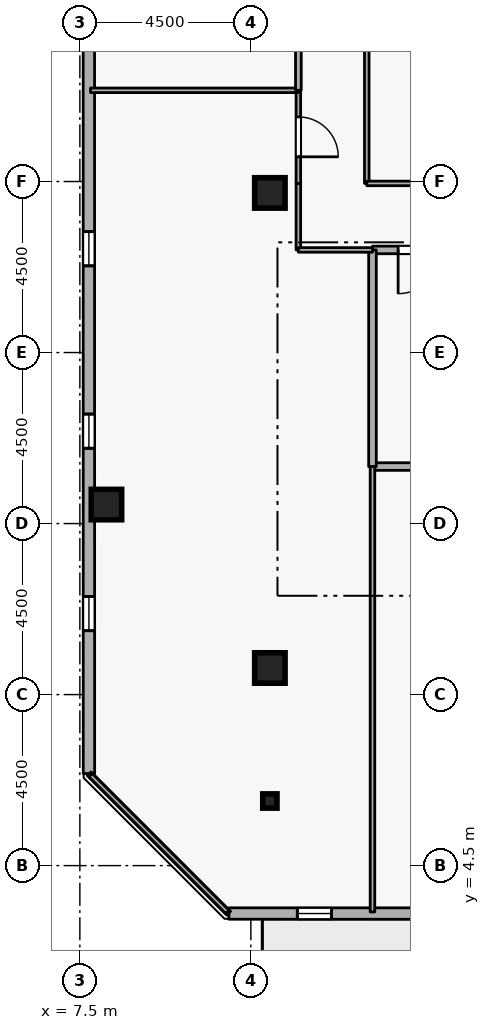
"""IFC4 building model, lengths in metres.
Left out: names, types, materials, properties, quantities, classifications, styles, units other than length and angle.
Written with IfcOpenShell. Run it as: python <this file> out.ifc"""

import sys

from ifc_helpers import new_model, si_unit, direction, frame, frame_2d, origin, origin_2d, place, context, subcontext, project, spatial, rectangle, i_section, extrude, element, fill, save


model = new_model("IFC4")
c1 = context("Model", 3, precision=1e-05, world=origin(), true_north=direction((0.0, 1.0)))
c2 = subcontext(c1, "Body", "Model", "MODEL_VIEW")
j1 = project(units=[si_unit("LENGTHUNIT", "METRE"), si_unit("PLANEANGLEUNIT", "RADIAN")], contexts=[c1])
p1 = place(None, origin())
s1 = spatial("IfcSite", under=j1, at=p1, CompositionType="ELEMENT")
p2 = place(p1, origin())
s2 = spatial("IfcBuilding", under=s1, at=p2, CompositionType="ELEMENT")
p3 = place(p2, frame((0.0, 0.0, 261.9)))
s3 = spatial("IfcBuildingStorey", under=s2, at=p3, CompositionType="ELEMENT", Elevation=261.9)
for number, where, z_axis, x_axis in (
    (1, (12.5, 9.7, 0.0), (0.0, 0.0, 1.0), (1.0, 0.0, 0.0)),
    (2, (8.2, 14.0, 0.0), (0.0, 0.0, 1.0), (1.0, 0.0, 0.0)),
    (3, (12.5, 22.2, 0.0), (0.0, 0.0, 1.0), (1.0, 0.0, 0.0)),
):
    element("IfcColumn", number, at=place(p3, frame(where, z_axis=z_axis, x_axis=x_axis)), inside=s3, PredefinedType="COLUMN", context=c2, shape_type="SweptSolid", body=[
        extrude(rectangle(XDim=0.8, YDim=0.8, at=origin_2d()), origin(), (0.0, 0.0, 1.0), 3.6),
    ])
p4 = place(p3, frame((12.5, 6.2, 0.0), z_axis=(0.0, 0.0, 1.0), x_axis=(1.0, 0.0, 0.0)))
e4 = element("IfcColumn", 4, at=p4, inside=s3, PredefinedType="COLUMN", context=c2, shape_type="SweptSolid", body=[
    extrude(i_section(OverallWidth=0.375, OverallDepth=0.375, WebThickness=0.017, FlangeThickness=0.027, FilletRadius=0.015, at=origin_2d()), origin(), (0.0, 0.0, 1.0), 3.6),
])
p5 = place(p3, frame((11.422, 3.239, 0.0), z_axis=(0.0, 0.0, 1.0), x_axis=(0.999999994606, -0.000103863011, 0.0)))
e5 = element("IfcWall", 5, at=p5, inside=s3, PredefinedType="STANDARD", context=c2, shape_type="SweptSolid", body=[
    extrude(rectangle(XDim=35.259, YDim=0.3, at=frame_2d((17.629, 0.0))), origin(), (0.0, 0.0, 1.0), 2.7),
])
p6 = place(p5, frame((22.58, 0.0, 0.0)))
e6 = element("IfcOpeningElement", 6, at=p6, cuts=e5, PredefinedType="OPENING", context=c2, shape_type="SweptSolid", body=[
    extrude(rectangle(XDim=1.0, YDim=2.08, at=frame_2d((0.5, 1.04))), frame((0.0, 0.16, 0.0), z_axis=(0.0, -1.0, 0.0), x_axis=(1.0, 0.0, 0.0)), (0.0, 0.0, 1.0), 0.32),
])
p7 = place(p5, frame((1.8, 0.0, 0.72)))
e7 = element("IfcOpeningElement", 7, at=p7, cuts=e5, PredefinedType="OPENING", context=c2, shape_type="SweptSolid", body=[
    extrude(rectangle(XDim=0.9, YDim=1.75, at=frame_2d((0.45, 0.875))), frame((0.0, 0.16, 0.0), z_axis=(0.0, -1.0, 0.0), x_axis=(1.0, 0.0, 0.0)), (0.0, 0.0, 1.0), 0.32),
])
p8 = place(p5, frame((6.6, 0.0, 0.72)))
e8 = element("IfcOpeningElement", 8, at=p8, cuts=e5, PredefinedType="OPENING", context=c2, shape_type="SweptSolid", body=[
    extrude(rectangle(XDim=0.9, YDim=1.75, at=frame_2d((0.45, 0.875))), frame((0.0, 0.16, 0.0), z_axis=(0.0, -1.0, 0.0), x_axis=(1.0, 0.0, 0.0)), (0.0, 0.0, 1.0), 0.32),
])
p9 = place(p5, frame((11.4, 0.0, 0.72)))
e9 = element("IfcOpeningElement", 9, at=p9, cuts=e5, PredefinedType="OPENING", context=c2, shape_type="SweptSolid", body=[
    extrude(rectangle(XDim=0.9, YDim=1.75, at=frame_2d((0.45, 0.875))), frame((0.0, 0.16, 0.0), z_axis=(0.0, -1.0, 0.0), x_axis=(1.0, 0.0, 0.0)), (0.0, 0.0, 1.0), 0.32),
])
p10 = place(p5, frame((16.2, 0.0, 0.72)))
e10 = element("IfcOpeningElement", 10, at=p10, cuts=e5, PredefinedType="OPENING", context=c2, shape_type="SweptSolid", body=[
    extrude(rectangle(XDim=0.9, YDim=1.75, at=frame_2d((0.45, 0.875))), frame((0.0, 0.16, 0.0), z_axis=(0.0, -1.0, 0.0), x_axis=(1.0, 0.0, 0.0)), (0.0, 0.0, 1.0), 0.32),
])
p11 = place(p5, frame((25.8, 0.0, 0.72)))
e11 = element("IfcOpeningElement", 11, at=p11, cuts=e5, PredefinedType="OPENING", context=c2, shape_type="SweptSolid", body=[
    extrude(rectangle(XDim=0.9, YDim=1.75, at=frame_2d((0.45, 0.875))), frame((0.0, 0.16, 0.0), z_axis=(0.0, -1.0, 0.0), x_axis=(1.0, 0.0, 0.0)), (0.0, 0.0, 1.0), 0.32),
])
p12 = place(p5, frame((30.6, 0.0, 0.72)))
e12 = element("IfcOpeningElement", 12, at=p12, cuts=e5, PredefinedType="OPENING", context=c2, shape_type="SweptSolid", body=[
    extrude(rectangle(XDim=0.9, YDim=1.75, at=frame_2d((0.45, 0.875))), frame((0.0, 0.16, 0.0), z_axis=(0.0, -1.0, 0.0), x_axis=(1.0, 0.0, 0.0)), (0.0, 0.0, 1.0), 0.32),
])
p13 = place(p3, frame((7.735, 42.181, 0.0), z_axis=(0.0, 0.0, 1.0), x_axis=(0.000103863011, -0.999999994606, 0.0)))
e13 = element("IfcWall", 13, at=p13, inside=s3, PredefinedType="STANDARD", context=c2, shape_type="SweptSolid", body=[
    extrude(rectangle(XDim=35.259, YDim=0.3, at=frame_2d((17.629, 0.0))), origin(), (0.0, 0.0, 1.0), 2.7),
])
p14 = place(p13, frame((6.6, 0.0, 0.72)))
e14 = element("IfcOpeningElement", 14, at=p14, cuts=e13, PredefinedType="OPENING", context=c2, shape_type="SweptSolid", body=[
    extrude(rectangle(XDim=0.9, YDim=1.75, at=frame_2d((0.45, 0.875))), frame((0.0, 0.16, 0.0), z_axis=(0.0, -1.0, 0.0), x_axis=(1.0, 0.0, 0.0)), (0.0, 0.0, 1.0), 0.32),
])
p15 = place(p13, frame((11.4, 0.0, 0.72)))
e15 = element("IfcOpeningElement", 15, at=p15, cuts=e13, PredefinedType="OPENING", context=c2, shape_type="SweptSolid", body=[
    extrude(rectangle(XDim=0.9, YDim=1.75, at=frame_2d((0.45, 0.875))), frame((0.0, 0.16, 0.0), z_axis=(0.0, -1.0, 0.0), x_axis=(1.0, 0.0, 0.0)), (0.0, 0.0, 1.0), 0.32),
])
p16 = place(p13, frame((21.0, 0.0, 0.72)))
e16 = element("IfcOpeningElement", 16, at=p16, cuts=e13, PredefinedType="OPENING", context=c2, shape_type="SweptSolid", body=[
    extrude(rectangle(XDim=0.9, YDim=1.75, at=frame_2d((0.45, 0.875))), frame((0.0, 0.16, 0.0), z_axis=(0.0, -1.0, 0.0), x_axis=(1.0, 0.0, 0.0)), (0.0, 0.0, 1.0), 0.32),
])
p17 = place(p13, frame((25.8, 0.0, 0.72)))
e17 = element("IfcOpeningElement", 17, at=p17, cuts=e13, PredefinedType="OPENING", context=c2, shape_type="SweptSolid", body=[
    extrude(rectangle(XDim=0.9, YDim=1.75, at=frame_2d((0.45, 0.875))), frame((0.0, 0.16, 0.0), z_axis=(0.0, -1.0, 0.0), x_axis=(1.0, 0.0, 0.0)), (0.0, 0.0, 1.0), 0.32),
])
p18 = place(p13, frame((30.6, 0.0, 0.72)))
e18 = element("IfcOpeningElement", 18, at=p18, cuts=e13, PredefinedType="OPENING", context=c2, shape_type="SweptSolid", body=[
    extrude(rectangle(XDim=0.9, YDim=1.75, at=frame_2d((0.45, 0.875))), frame((0.0, 0.16, 0.0), z_axis=(0.0, -1.0, 0.0), x_axis=(1.0, 0.0, 0.0)), (0.0, 0.0, 1.0), 0.32),
])
p19 = place(p3, frame((15.2, 15.0, 0.0), z_axis=(0.0, 0.0, 1.0), x_axis=(1.0, 0.0, 0.0)))
e19 = element("IfcWall", 19, at=p19, inside=s3, PredefinedType="STANDARD", context=c2, shape_type="SweptSolid", body=[
    extrude(rectangle(XDim=2.5, YDim=0.2, at=frame_2d((1.25, 0.0))), origin(), (0.0, 0.0, 1.0), 3.34),
])
p20 = place(p3, frame((17.7, 20.7, 0.0), z_axis=(0.0, 0.0, 1.0), x_axis=(-1.0, 0.0, 0.0)))
e20 = element("IfcWall", 20, at=p20, inside=s3, PredefinedType="STANDARD", context=c2, shape_type="SweptSolid", body=[
    extrude(rectangle(XDim=2.5, YDim=0.2, at=frame_2d((1.25, 0.0))), origin(), (0.0, 0.0, 1.0), 3.34),
])
p21 = place(p20, frame((0.675, 0.0, 0.0)))
e21 = element("IfcOpeningElement", 21, at=p21, cuts=e20, PredefinedType="OPENING", context=c2, shape_type="SweptSolid", body=[
    extrude(rectangle(XDim=1.15, YDim=2.1, at=frame_2d((0.575, 1.05))), frame((0.0, 0.11, 0.0), z_axis=(0.0, -1.0, 0.0), x_axis=(1.0, 0.0, 0.0)), (0.0, 0.0, 1.0), 0.22),
])
p22 = place(p3, frame((15.2, 20.7, 0.0), z_axis=(0.0, 0.0, 1.0), x_axis=(0.0, -1.0, 0.0)))
e22 = element("IfcWall", 22, at=p22, inside=s3, PredefinedType="STANDARD", context=c2, shape_type="SweptSolid", body=[
    extrude(rectangle(XDim=5.7, YDim=0.2, at=frame_2d((2.85, 0.0))), origin(), (0.0, 0.0, 1.0), 3.34),
])
p23 = place(p3, frame((13.25, 24.9, 0.0), z_axis=(0.0, 0.0, 1.0), x_axis=(0.0, -1.0, 0.0)))
e23 = element("IfcWall", 23, at=p23, inside=s3, PredefinedType="PARTITIONING", context=c2, shape_type="SweptSolid", body=[
    extrude(rectangle(XDim=2.45, YDim=0.12, at=frame_2d((1.225, 0.0))), origin(), (0.0, 0.0, 1.0), 3.34),
])
p24 = place(p23, frame((0.7, 0.0, 0.0)))
e24 = element("IfcOpeningElement", 24, at=p24, cuts=e23, PredefinedType="OPENING", context=c2, shape_type="SweptSolid", body=[
    extrude(rectangle(XDim=1.05, YDim=2.1, at=frame_2d((0.525, 1.05))), frame((0.0, 0.07, 0.0), z_axis=(0.0, -1.0, 0.0), x_axis=(1.0, 0.0, 0.0)), (0.0, 0.0, 1.0), 0.14),
])
p25 = place(p3, frame((13.25, 22.45, 0.0), z_axis=(0.0, 0.0, 1.0), x_axis=(0.0, -1.0, 0.0)))
e25 = element("IfcWall", 25, at=p25, inside=s3, PredefinedType="PARTITIONING", context=c2, shape_type="SweptSolid", body=[
    extrude(rectangle(XDim=1.75, YDim=0.12, at=frame_2d((0.875, 0.0))), origin(), (0.0, 0.0, 1.0), 3.34),
])
p26 = place(p3, frame((13.25, 20.7, 0.0), z_axis=(0.0, 0.0, 1.0), x_axis=(1.0, 0.0, 0.0)))
e26 = element("IfcWall", 26, at=p26, inside=s3, PredefinedType="PARTITIONING", context=c2, shape_type="SweptSolid", body=[
    extrude(rectangle(XDim=1.95, YDim=0.12, at=frame_2d((0.975, 0.0))), origin(), (0.0, 0.0, 1.0), 3.34),
])
p27 = place(p3, frame((15.2, 15.0, 0.0), z_axis=(0.0, 0.0, 1.0), x_axis=(0.0, -1.0, 0.0)))
e27 = element("IfcWall", 27, at=p27, inside=s3, PredefinedType="PARTITIONING", context=c2, shape_type="SweptSolid", body=[
    extrude(rectangle(XDim=11.72, YDim=0.12, at=frame_2d((5.86, 0.0))), origin(), (0.0, 0.0, 1.0), 3.34),
])
p28 = place(p3, frame((11.383, 3.28, 0.0), z_axis=(0.0, 0.0, 1.0), x_axis=(-0.707106781187, 0.707106781187, 0.0)))
e28 = element("IfcWall", 28, at=p28, inside=s3, PredefinedType="PARTITIONING", context=c2, shape_type="SweptSolid", body=[
    extrude(rectangle(XDim=5.095, YDim=0.12, at=frame_2d((2.547, 0.0))), origin(), (0.0, 0.0, 1.0), 3.34),
])
p29 = place(p3, frame((7.78, 24.9, 0.0), z_axis=(0.0, 0.0, 1.0), x_axis=(1.0, 0.0, 0.0)))
e29 = element("IfcWall", 29, at=p29, inside=s3, PredefinedType="PARTITIONING", context=c2, shape_type="SweptSolid", body=[
    extrude(rectangle(XDim=5.47, YDim=0.12, at=frame_2d((2.735, 0.0))), origin(), (0.0, 0.0, 1.0), 3.34),
])
p30 = place(p3, frame((13.25, 29.1, 0.0), z_axis=(0.0, 0.0, 1.0), x_axis=(0.0, -1.0, 0.0)))
e30 = element("IfcWall", 30, at=p30, inside=s3, PredefinedType="PARTITIONING", context=c2, shape_type="SweptSolid", body=[
    extrude(rectangle(XDim=4.2, YDim=0.15, at=frame_2d((2.1, 0.0))), origin(), (0.0, 0.0, 1.0), 3.34),
])
p31 = place(p30, frame((1.45, 0.0, 0.0)))
e31 = element("IfcOpeningElement", 31, at=p31, cuts=e30, PredefinedType="OPENING", context=c2, shape_type="SweptSolid", body=[
    extrude(rectangle(XDim=1.3, YDim=2.12, at=frame_2d((0.65, 1.06))), frame((0.0, 0.085, 0.0), z_axis=(0.0, -1.0, 0.0), x_axis=(1.0, 0.0, 0.0)), (0.0, 0.0, 1.0), 0.17),
])
p32 = place(p3, frame((15.05, 22.45, 0.0), z_axis=(0.0, 0.0, 1.0), x_axis=(0.0, 1.0, 0.0)))
e32 = element("IfcWall", 32, at=p32, inside=s3, PredefinedType="PARTITIONING", context=c2, shape_type="SweptSolid", body=[
    extrude(rectangle(XDim=9.1, YDim=0.12, at=frame_2d((4.55, 0.0))), origin(), (0.0, 0.0, 1.0), 3.34),
])
p33 = place(p32, frame((4.075, 0.0, 0.0)))
e33 = element("IfcOpeningElement", 33, at=p33, cuts=e32, PredefinedType="OPENING", context=c2, shape_type="SweptSolid", body=[
    extrude(rectangle(XDim=0.95, YDim=2.1, at=frame_2d((0.475, 1.05))), frame((0.0, 0.07, 0.0), z_axis=(0.0, -1.0, 0.0), x_axis=(1.0, 0.0, 0.0)), (0.0, 0.0, 1.0), 0.14),
])
p34 = place(p3, frame((20.9, 22.45, 0.0), z_axis=(0.0, 0.0, 1.0), x_axis=(-1.0, 0.0, 0.0)))
e34 = element("IfcWall", 34, at=p34, inside=s3, PredefinedType="PARTITIONING", context=c2, shape_type="SweptSolid", body=[
    extrude(rectangle(XDim=5.85, YDim=0.12, at=frame_2d((2.925, 0.0))), origin(), (0.0, 0.0, 1.0), 3.34),
])
p35 = place(p7, origin())
e35 = element("IfcWindow", 35, at=p35, inside=s3, PartitioningType="SINGLE_PANEL", PredefinedType="WINDOW", context=c2, shape_type="SweptSolid", body=[
    extrude(rectangle(XDim=0.9, YDim=1.75, at=frame_2d((0.45, 0.875))), frame((0.0, 0.03, 0.0), z_axis=(0.0, -1.0, 0.0), x_axis=(1.0, 0.0, 0.0)), (0.0, 0.0, 1.0), 0.06),
])
fill(e7, e35)
p36 = place(p16, origin())
e36 = element("IfcWindow", 36, at=p36, inside=s3, PartitioningType="SINGLE_PANEL", PredefinedType="WINDOW", context=c2, shape_type="SweptSolid", body=[
    extrude(rectangle(XDim=0.9, YDim=1.75, at=frame_2d((0.45, 0.875))), frame((0.0, 0.03, 0.0), z_axis=(0.0, -1.0, 0.0), x_axis=(1.0, 0.0, 0.0)), (0.0, 0.0, 1.0), 0.06),
])
fill(e16, e36)
p37 = place(p17, origin())
e37 = element("IfcWindow", 37, at=p37, inside=s3, PartitioningType="SINGLE_PANEL", PredefinedType="WINDOW", context=c2, shape_type="SweptSolid", body=[
    extrude(rectangle(XDim=0.9, YDim=1.75, at=frame_2d((0.45, 0.875))), frame((0.0, 0.03, 0.0), z_axis=(0.0, -1.0, 0.0), x_axis=(1.0, 0.0, 0.0)), (0.0, 0.0, 1.0), 0.06),
])
fill(e17, e37)
p38 = place(p18, origin())
e38 = element("IfcWindow", 38, at=p38, inside=s3, PartitioningType="SINGLE_PANEL", PredefinedType="WINDOW", context=c2, shape_type="SweptSolid", body=[
    extrude(rectangle(XDim=0.9, YDim=1.75, at=frame_2d((0.45, 0.875))), frame((0.0, 0.03, 0.0), z_axis=(0.0, -1.0, 0.0), x_axis=(1.0, 0.0, 0.0)), (0.0, 0.0, 1.0), 0.06),
])
fill(e18, e38)
p39 = place(p21, origin())
e39 = element("IfcDoor", 39, at=p39, inside=s3, OperationType="SINGLE_SWING_RIGHT", PredefinedType="DOOR", context=c2, shape_type="SweptSolid", body=[
    extrude(rectangle(XDim=1.15, YDim=2.1, at=frame_2d((0.575, 1.05))), frame((0.0, 0.025, 0.0), z_axis=(0.0, -1.0, 0.0), x_axis=(1.0, 0.0, 0.0)), (0.0, 0.0, 1.0), 0.05),
])
fill(e21, e39)
p40 = place(p24, origin())
e40 = element("IfcDoor", 40, at=p40, inside=s3, OperationType="SINGLE_SWING_RIGHT", PredefinedType="DOOR", context=c2, shape_type="SweptSolid", body=[
    extrude(rectangle(XDim=1.05, YDim=2.1, at=frame_2d((0.525, 1.05))), frame((0.0, 0.025, 0.0), z_axis=(0.0, -1.0, 0.0), x_axis=(1.0, 0.0, 0.0)), (0.0, 0.0, 1.0), 0.05),
])
fill(e24, e40)
save(model, sys.argv[1])
